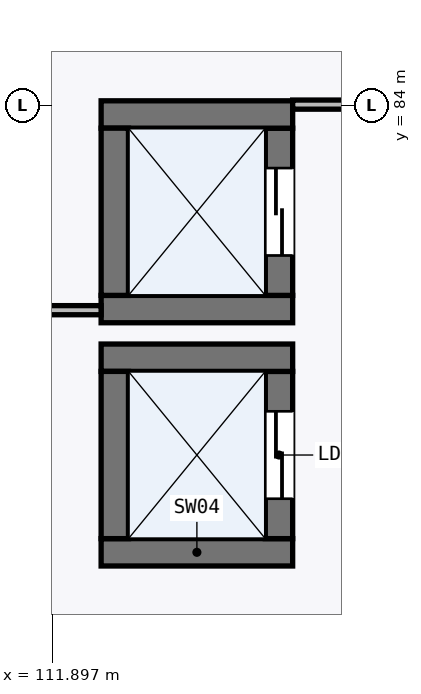
"""IFC4 building model, lengths in metres.
Left out: names, types, materials, properties, quantities, classifications, styles, units other than length and angle.
Written with IfcOpenShell. Run it as: python <this file> out.ifc"""

import sys

from ifc_helpers import new_model, si_unit, direction, frame, frame_2d, origin, place, context, subcontext, project, spatial, rectangle, extrude, element, fill, save


model = new_model("IFC4")
c1 = context("Model", 3, precision=1e-05, world=origin(), true_north=direction((0.0, 1.0)))
c2 = subcontext(c1, "Body", "Model", "MODEL_VIEW")
j1 = project(units=[si_unit("LENGTHUNIT", "METRE"), si_unit("PLANEANGLEUNIT", "RADIAN")], contexts=[c1])
p1 = place(None, origin())
s1 = spatial("IfcSite", under=j1, at=p1, CompositionType="ELEMENT")
p2 = place(p1, origin())
s2 = spatial("IfcBuilding", under=s1, at=p2, CompositionType="ELEMENT")
p3 = place(p2, frame((0.0, 0.0, 31.8)))
s3 = spatial("IfcBuildingStorey", under=s2, at=p3, CompositionType="ELEMENT", Elevation=31.8)
p4 = place(p3, frame((112.54, 78.12, 0.0), z_axis=(0.0, 0.0, 1.0), x_axis=(1.0, 0.0, 0.0)))
e1 = element("IfcWall", 1, at=p4, inside=s3, PredefinedType="SHEAR", context=c2, shape_type="SweptSolid", body=[
    extrude(rectangle(XDim=2.52, YDim=0.36, at=frame_2d((1.26, 0.0))), origin(), (0.0, 0.0, 1.0), 4.245),
])
p5 = place(p3, frame((114.88, 78.3, 0.0), z_axis=(0.0, 0.0, 1.0), x_axis=(0.0, 1.0, 0.0)))
e2 = element("IfcWall", 2, at=p5, inside=s3, PredefinedType="SHEAR", context=c2, shape_type="SweptSolid", body=[
    extrude(rectangle(XDim=2.2, YDim=0.36, at=frame_2d((1.1, 0.0))), origin(), (0.0, 0.0, 1.0), 4.245),
])
p6 = place(p5, frame((0.525, 0.0, 0.0)))
e3 = element("IfcOpeningElement", 3, at=p6, cuts=e2, PredefinedType="OPENING", context=c2, shape_type="SweptSolid", body=[
    extrude(rectangle(XDim=1.15, YDim=2.2, at=frame_2d((0.575, 1.1))), frame((0.0, 0.19, 0.0), z_axis=(0.0, -1.0, 0.0), x_axis=(1.0, 0.0, 0.0)), (0.0, 0.0, 1.0), 0.38),
])
p7 = place(p3, frame((115.06, 80.68, 0.0), z_axis=(0.0, 0.0, 1.0), x_axis=(-1.0, 0.0, 0.0)))
e4 = element("IfcWall", 4, at=p7, inside=s3, PredefinedType="SHEAR", context=c2, shape_type="SweptSolid", body=[
    extrude(rectangle(XDim=2.52, YDim=0.36, at=frame_2d((1.26, 0.0))), origin(), (0.0, 0.0, 1.0), 4.245),
])
p8 = place(p3, frame((112.72, 80.5, 0.0), z_axis=(0.0, 0.0, 1.0), x_axis=(0.0, -1.0, 0.0)))
e5 = element("IfcWall", 5, at=p8, inside=s3, PredefinedType="SHEAR", context=c2, shape_type="SweptSolid", body=[
    extrude(rectangle(XDim=2.2, YDim=0.36, at=frame_2d((1.1, 0.0))), origin(), (0.0, 0.0, 1.0), 4.245),
])
p9 = place(p3, frame((112.54, 81.32, 0.0), z_axis=(0.0, 0.0, 1.0), x_axis=(1.0, 0.0, 0.0)))
e6 = element("IfcWall", 6, at=p9, inside=s3, PredefinedType="SHEAR", context=c2, shape_type="SweptSolid", body=[
    extrude(rectangle(XDim=2.52, YDim=0.36, at=frame_2d((1.26, 0.0))), origin(), (0.0, 0.0, 1.0), 4.245),
])
p10 = place(p3, frame((114.88, 81.5, 0.0), z_axis=(0.0, 0.0, 1.0), x_axis=(0.0, 1.0, 0.0)))
e7 = element("IfcWall", 7, at=p10, inside=s3, PredefinedType="SHEAR", context=c2, shape_type="SweptSolid", body=[
    extrude(rectangle(XDim=2.2, YDim=0.36, at=frame_2d((1.1, 0.0))), origin(), (0.0, 0.0, 1.0), 4.245),
])
p11 = place(p10, frame((0.525, 0.0, 0.0)))
e8 = element("IfcOpeningElement", 8, at=p11, cuts=e7, PredefinedType="OPENING", context=c2, shape_type="SweptSolid", body=[
    extrude(rectangle(XDim=1.15, YDim=2.2, at=frame_2d((0.575, 1.1))), frame((0.0, 0.19, 0.0), z_axis=(0.0, -1.0, 0.0), x_axis=(1.0, 0.0, 0.0)), (0.0, 0.0, 1.0), 0.38),
])
p12 = place(p3, frame((115.06, 83.88, 0.0), z_axis=(0.0, 0.0, 1.0), x_axis=(-1.0, 0.0, 0.0)))
e9 = element("IfcWall", 9, at=p12, inside=s3, PredefinedType="SHEAR", context=c2, shape_type="SweptSolid", body=[
    extrude(rectangle(XDim=2.52, YDim=0.36, at=frame_2d((1.26, 0.0))), origin(), (0.0, 0.0, 1.0), 4.245),
])
p13 = place(p3, frame((112.72, 83.7, 0.0), z_axis=(0.0, 0.0, 1.0), x_axis=(0.0, -1.0, 0.0)))
e10 = element("IfcWall", 10, at=p13, inside=s3, PredefinedType="SHEAR", context=c2, shape_type="SweptSolid", body=[
    extrude(rectangle(XDim=2.2, YDim=0.36, at=frame_2d((1.1, 0.0))), origin(), (0.0, 0.0, 1.0), 4.245),
])
p14 = place(p3, frame((109.495, 81.305, 0.0), z_axis=(0.0, 0.0, 1.0), x_axis=(1.0, 0.0, 0.0)))
e11 = element("IfcWall", 11, at=p14, inside=s3, PredefinedType="PARTITIONING", context=c2, shape_type="SweptSolid", body=[
    extrude(rectangle(XDim=3.045, YDim=0.12, at=frame_2d((1.522, 0.0))), origin(), (0.0, 0.0, 1.0), 4.245),
])
p15 = place(p14, frame((0.998, 0.0, 0.0)))
e12 = element("IfcOpeningElement", 12, at=p15, cuts=e11, PredefinedType="OPENING", context=c2, shape_type="SweptSolid", body=[
    extrude(rectangle(XDim=1.05, YDim=2.1, at=frame_2d((0.525, 1.05))), frame((0.0, 0.07, 0.0), z_axis=(0.0, -1.0, 0.0), x_axis=(1.0, 0.0, 0.0)), (0.0, 0.0, 1.0), 0.14),
])
p16 = place(p3, frame((115.06, 84.01, 0.0), z_axis=(0.0, 0.0, 1.0), x_axis=(1.0, 0.0, 0.0)))
e13 = element("IfcWall", 13, at=p16, inside=s3, PredefinedType="PARTITIONING", context=c2, shape_type="SweptSolid", body=[
    extrude(rectangle(XDim=0.93, YDim=0.12, at=frame_2d((0.465, 0.0))), origin(), (0.0, 0.0, 1.0), 3.641),
])
p17 = place(p6, frame((1.15, 0.0, 0.0), z_axis=(0.0, 0.0, 1.0), x_axis=(-1.0, 0.0, 0.0)))
e14 = element("IfcDoor", 14, at=p17, inside=s3, OperationType="DOUBLE_DOOR_SLIDING", PredefinedType="DOOR", context=c2, shape_type="SweptSolid", body=[
    extrude(rectangle(XDim=1.15, YDim=2.2, at=frame_2d((0.575, 1.1))), frame((0.0, 0.025, 0.0), z_axis=(0.0, -1.0, 0.0), x_axis=(1.0, 0.0, 0.0)), (0.0, 0.0, 1.0), 0.05),
])
fill(e3, e14)
p18 = place(p11, frame((1.15, 0.0, 0.0), z_axis=(0.0, 0.0, 1.0), x_axis=(-1.0, 0.0, 0.0)))
e15 = element("IfcDoor", 15, at=p18, inside=s3, OperationType="DOUBLE_DOOR_SLIDING", PredefinedType="DOOR", context=c2, shape_type="SweptSolid", body=[
    extrude(rectangle(XDim=1.15, YDim=2.2, at=frame_2d((0.575, 1.1))), frame((0.0, 0.025, 0.0), z_axis=(0.0, -1.0, 0.0), x_axis=(1.0, 0.0, 0.0)), (0.0, 0.0, 1.0), 0.05),
])
fill(e8, e15)
save(model, sys.argv[1])
